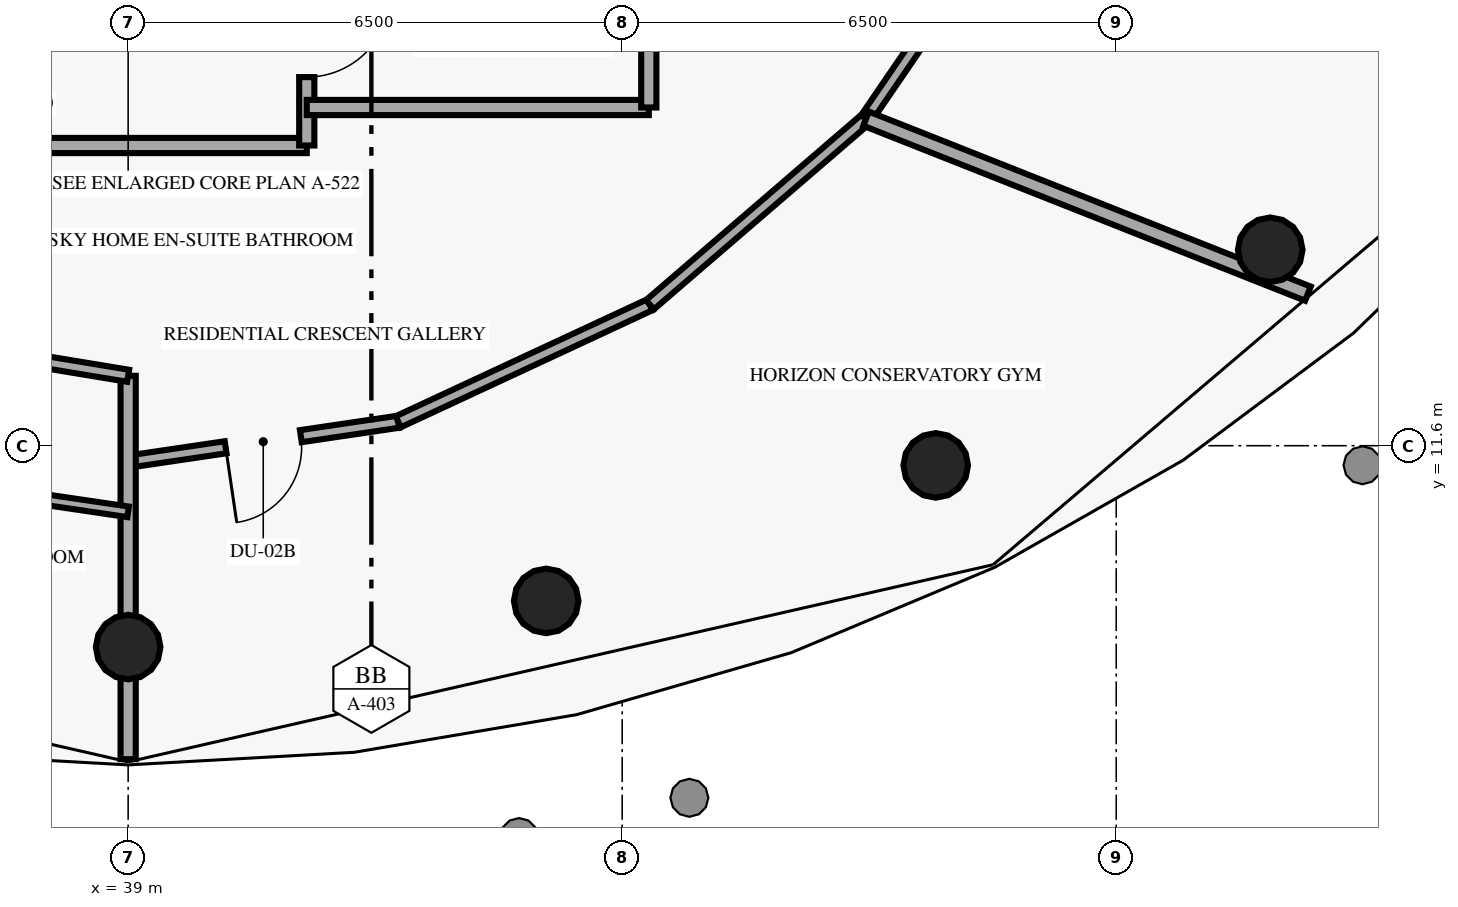
"""IFC4 building model, lengths in metres.
Left out: names, types, materials, properties, quantities, classifications, styles, units other than length and angle.
Written with IfcOpenShell. Run it as: python <this file> out.ifc"""

import sys

from ifc_helpers import new_model, si_unit, direction, frame, frame_2d, origin, origin_2d, place, context, subcontext, project, spatial, rectangle, circle, extrude, element, fill, save


model = new_model("IFC4")
c1 = context("Model", 3, precision=1e-05, world=origin(), true_north=direction((0.0, 1.0)))
c2 = subcontext(c1, "Body", "Model", "MODEL_VIEW")
j1 = project(units=[si_unit("LENGTHUNIT", "METRE"), si_unit("PLANEANGLEUNIT", "RADIAN")], contexts=[c1])
p1 = place(None, origin())
s1 = spatial("IfcSite", under=j1, at=p1, CompositionType="ELEMENT")
p2 = place(p1, origin())
s2 = spatial("IfcBuilding", under=s1, at=p2, CompositionType="ELEMENT")
p3 = place(p2, frame((0.0, 0.0, 251.95)))
s3 = spatial("IfcBuildingStorey", under=s2, at=p3, CompositionType="ELEMENT", Elevation=251.95)
for number, where, z_axis, x_axis in (
    (1, (39.0, 8.95, 0.0), (0.0, 0.0, 1.0), (1.0, 0.0, 0.0)),
    (2, (44.5, 9.558, 0.0), (0.0, 0.0, 1.0), (1.0, 0.0, 0.0)),
    (3, (49.625, 11.341, 0.0), (0.0, 0.0, 1.0), (1.0, 0.0, 0.0)),
    (4, (54.026, 14.178, 0.0), (0.0, 0.0, 1.0), (1.0, 0.0, 0.0)),
):
    element("IfcColumn", number, at=place(p3, frame(where, z_axis=z_axis, x_axis=x_axis)), inside=s3, PredefinedType="COLUMN", context=c2, shape_type="SweptSolid", body=[
        extrude(circle(Radius=0.425, at=origin_2d()), origin(), (0.0, 0.0, 1.0), 3.39),
    ])
p4 = place(p3, frame((33.8, 15.55, 0.0), z_axis=(0.0, 0.0, 1.0), x_axis=(1.0, 0.0, 0.0)))
e5 = element("IfcWall", 5, at=p4, inside=s3, PredefinedType="SOLIDWALL", context=c2, shape_type="SweptSolid", body=[
    extrude(rectangle(XDim=7.55, YDim=0.2, at=frame_2d((3.775, 0.0))), origin(), (0.0, 0.0, 1.0), 3.39),
])
p5 = place(p3, frame((41.35, 15.55, 0.0), z_axis=(0.0, 0.0, 1.0), x_axis=(0.0, 1.0, 0.0)))
e6 = element("IfcWall", 6, at=p5, inside=s3, PredefinedType="SOLIDWALL", context=c2, shape_type="SweptSolid", body=[
    extrude(rectangle(XDim=2.8, YDim=0.2, at=frame_2d((1.4, 0.0))), origin(), (0.0, 0.0, 1.0), 3.39),
])
p6 = place(p5, frame((0.9, 0.0, 0.0)))
e7 = element("IfcOpeningElement", 7, at=p6, cuts=e6, PredefinedType="OPENING", context=c2, shape_type="SweptSolid", body=[
    extrude(rectangle(XDim=1.1, YDim=2.15, at=frame_2d((0.55, 1.075))), frame((0.0, 0.11, 0.0), z_axis=(0.0, -1.0, 0.0), x_axis=(1.0, 0.0, 0.0)), (0.0, 0.0, 1.0), 0.22),
])
p7 = place(p3, frame((41.35, 16.05, 0.0), z_axis=(0.0, 0.0, 1.0), x_axis=(1.0, 0.0, 0.0)))
e8 = element("IfcWall", 8, at=p7, inside=s3, PredefinedType="SOLIDWALL", context=c2, shape_type="SweptSolid", body=[
    extrude(rectangle(XDim=4.5, YDim=0.2, at=frame_2d((2.25, 0.0))), origin(), (0.0, 0.0, 1.0), 3.39),
])
p8 = place(p3, frame((45.85, 16.05, 0.0), z_axis=(0.0, 0.0, 1.0), x_axis=(0.0, 1.0, 0.0)))
e9 = element("IfcWall", 9, at=p8, inside=s3, PredefinedType="SOLIDWALL", context=c2, shape_type="SweptSolid", body=[
    extrude(rectangle(XDim=2.3, YDim=0.2, at=frame_2d((1.15, 0.0))), origin(), (0.0, 0.0, 1.0), 3.39),
])
p9 = place(p3, frame((42.554, 11.915, 0.0), z_axis=(0.0, 0.0, 1.0), x_axis=(-0.989258488255, -0.146176754018, 0.0)))
e10 = element("IfcWall", 10, at=p9, inside=s3, PredefinedType="PARTITIONING", context=c2, shape_type="SweptSolid", body=[
    extrude(rectangle(XDim=3.593, YDim=0.16, at=frame_2d((1.796, 0.0))), origin(), (0.0, 0.0, 1.0), 3.39),
])
p10 = place(p9, frame((1.296, 0.0, 0.0)))
e11 = element("IfcOpeningElement", 11, at=p10, cuts=e10, PredefinedType="OPENING", context=c2, shape_type="SweptSolid", body=[
    extrude(rectangle(XDim=1.0, YDim=2.02, at=frame_2d((0.5, 1.01))), frame((0.0, 0.09, 0.0), z_axis=(0.0, -1.0, 0.0), x_axis=(1.0, 0.0, 0.0)), (0.0, 0.0, 1.0), 0.18),
])
p11 = place(p3, frame((42.554, 11.915, 0.0), z_axis=(0.0, 0.0, 1.0), x_axis=(0.906718733669, 0.421735862851, 0.0)))
e12 = element("IfcWall", 12, at=p11, inside=s3, PredefinedType="PARTITIONING", context=c2, shape_type="SweptSolid", body=[
    extrude(rectangle(XDim=3.652, YDim=0.16, at=frame_2d((1.826, 0.0))), origin(), (0.0, 0.0, 1.0), 3.39),
])
p12 = place(p3, frame((45.865, 13.455, 0.0), z_axis=(0.0, 0.0, 1.0), x_axis=(0.75790014932, 0.652370572344, 0.0)))
e13 = element("IfcWall", 13, at=p12, inside=s3, PredefinedType="PARTITIONING", context=c2, shape_type="SweptSolid", body=[
    extrude(rectangle(XDim=3.752, YDim=0.16, at=frame_2d((1.876, 0.0))), origin(), (0.0, 0.0, 1.0), 3.39),
])
p13 = place(p3, frame((50.891, 19.095, 0.0), z_axis=(0.0, 0.0, 1.0), x_axis=(-0.564366970485, -0.825524029103, 0.0)))
e14 = element("IfcWall", 14, at=p13, inside=s3, PredefinedType="PARTITIONING", context=c2, shape_type="SweptSolid", body=[
    extrude(rectangle(XDim=3.866, YDim=0.16, at=frame_2d((1.933, 0.0))), origin(), (0.0, 0.0, 1.0), 3.39),
])
p14 = place(p13, frame((1.433, 0.0, 0.0)))
e15 = element("IfcOpeningElement", 15, at=p14, cuts=e14, PredefinedType="OPENING", context=c2, shape_type="SweptSolid", body=[
    extrude(rectangle(XDim=1.0, YDim=2.02, at=frame_2d((0.5, 1.01))), frame((0.0, 0.09, 0.0), z_axis=(0.0, -1.0, 0.0), x_axis=(1.0, 0.0, 0.0)), (0.0, 0.0, 1.0), 0.18),
])
p15 = place(p3, frame((39.0, 12.52, 0.0), z_axis=(0.0, 0.0, 1.0), x_axis=(0.0, -1.0, 0.0)))
e16 = element("IfcWall", 16, at=p15, inside=s3, PredefinedType="PARTITIONING", context=c2, shape_type="SweptSolid", body=[
    extrude(rectangle(XDim=3.57, YDim=0.2, at=frame_2d((1.785, 0.0))), origin(), (0.0, 0.0, 1.0), 2.19),
])
p16 = place(p3, frame((39.0, 8.95, 0.0), z_axis=(0.0, 0.0, 1.0), x_axis=(0.0, -1.0, 0.0)))
e17 = element("IfcWall", 17, at=p16, inside=s3, PredefinedType="PARTITIONING", context=c2, shape_type="SweptSolid", body=[
    extrude(rectangle(XDim=1.475, YDim=0.2, at=frame_2d((0.737, 0.0))), origin(), (0.0, 0.0, 1.0), 3.39),
])
p17 = place(p3, frame((48.709, 15.903, 0.0), z_axis=(0.0, 0.0, 1.0), x_axis=(0.929750366179, -0.368190516703, 0.0)))
e18 = element("IfcWall", 18, at=p17, inside=s3, PredefinedType="PARTITIONING", context=c2, shape_type="SweptSolid", body=[
    extrude(rectangle(XDim=6.252, YDim=0.2, at=frame_2d((3.126, 0.0))), origin(), (0.0, 0.0, 1.0), 3.39),
])
p18 = place(p3, frame((36.049, 13.007, 0.0), z_axis=(0.0, 0.0, 1.0), x_axis=(0.986650832406, -0.162850038111, 0.0)))
e19 = element("IfcWall", 19, at=p18, inside=s3, PredefinedType="PARTITIONING", context=c2, shape_type="SweptSolid", body=[
    extrude(rectangle(XDim=2.991, YDim=0.16, at=frame_2d((1.496, 0.0))), origin(), (0.0, 0.0, 1.0), 3.39),
])
p19 = place(p3, frame((39.0, 10.73, 0.0), z_axis=(0.0, 0.0, 1.0), x_axis=(-0.989330267414, 0.145690157451, 0.0)))
e20 = element("IfcWall", 20, at=p19, inside=s3, PredefinedType="PARTITIONING", context=c2, shape_type="SweptSolid", body=[
    extrude(rectangle(XDim=3.762, YDim=0.14, at=frame_2d((1.881, 0.0))), origin(), (0.0, 0.0, 1.0), 2.85),
])
p20 = place(p19, frame((1.456, 0.0, 0.0)))
e21 = element("IfcOpeningElement", 21, at=p20, cuts=e20, PredefinedType="OPENING", context=c2, shape_type="SweptSolid", body=[
    extrude(rectangle(XDim=0.85, YDim=2.02, at=frame_2d((0.425, 1.01))), frame((0.0, 0.08, 0.0), z_axis=(0.0, -1.0, 0.0), x_axis=(1.0, 0.0, 0.0)), (0.0, 0.0, 1.0), 0.16),
])
p21 = place(p6, origin())
e22 = element("IfcDoor", 22, at=p21, inside=s3, OperationType="SINGLE_SWING_RIGHT", PredefinedType="DOOR", context=c2, shape_type="SweptSolid", body=[
    extrude(rectangle(XDim=1.1, YDim=2.15, at=frame_2d((0.55, 1.075))), frame((0.0, 0.025, 0.0), z_axis=(0.0, -1.0, 0.0), x_axis=(1.0, 0.0, 0.0)), (0.0, 0.0, 1.0), 0.05),
])
fill(e7, e22)
p22 = place(p10, origin())
e23 = element("IfcDoor", 23, at=p22, inside=s3, OperationType="SINGLE_SWING_RIGHT", PredefinedType="DOOR", context=c2, shape_type="SweptSolid", body=[
    extrude(rectangle(XDim=1.0, YDim=2.02, at=frame_2d((0.5, 1.01))), frame((0.0, 0.025, 0.0), z_axis=(0.0, -1.0, 0.0), x_axis=(1.0, 0.0, 0.0)), (0.0, 0.0, 1.0), 0.05),
])
fill(e11, e23)
save(model, sys.argv[1])
